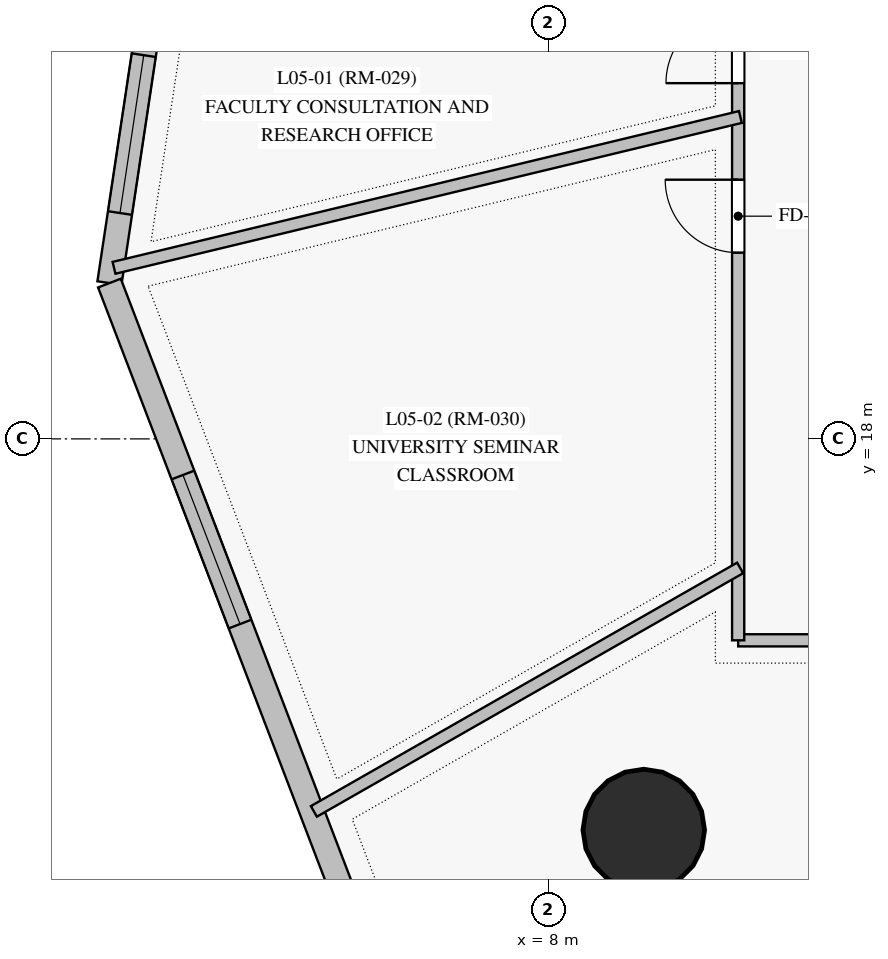
"""IFC4 building model, lengths in metres.
Left out: names, types, materials, properties, quantities, classifications, styles, units other than length and angle.
Written with IfcOpenShell. Run it as: python <this file> out.ifc"""

import sys

from ifc_helpers import new_model, si_unit, direction, frame, frame_2d, origin, origin_with_axes, origin_2d, place, context, subcontext, project, spatial, rectangle, circle, extrude, source, transform, mapped, element, fill, save


model = new_model("IFC4")
c1 = context("Model", 3, precision=1e-05, world=origin(), true_north=direction((0.0, 1.0)))
c2 = subcontext(c1, "Body", "Model", "MODEL_VIEW")
j1 = project(units=[si_unit("LENGTHUNIT", "METRE"), si_unit("PLANEANGLEUNIT", "RADIAN")], contexts=[c1])
p1 = place(None, origin())
s1 = spatial("IfcSite", under=j1, at=p1, CompositionType="ELEMENT")
p2 = place(p1, origin())
s2 = spatial("IfcBuilding", under=s1, at=p2, CompositionType="ELEMENT")
p3 = place(p2, frame((0.0, 0.0, 22.5)))
s3 = spatial("IfcBuildingStorey", under=s2, at=p3, CompositionType="ELEMENT", Elevation=22.5)
m1 = source(origin_with_axes(), c2, "Body", "SweptSolid", [
    extrude(circle(Radius=0.8, at=origin_2d()), origin(), (0.0, 0.0, 1.0), 4.0),
])
p4 = place(p3, frame((9.258, 12.854, 0.0), z_axis=(0.0, 0.0, 1.0), x_axis=(1.0, 0.0, 0.0)))
e1 = element("IfcColumn", 1, at=p4, inside=s3, PredefinedType="COLUMN", context=c2, shape_type="MappedRepresentation", body=[
    mapped(m1, transform((0.0, 0.0, 0.0), scale=1.0)),
])
p5 = place(p3, frame((3.835, 30.72, 0.0), z_axis=(0.0, 0.0, 1.0), x_axis=(-0.148854906236, -0.988859048039, 0.0)))
e2 = element("IfcWall", 2, at=p5, inside=s3, PredefinedType="SOLIDWALL", context=c2, shape_type="SweptSolid", body=[
    extrude(rectangle(XDim=10.79, YDim=0.32, at=frame_2d((5.395, 0.0))), origin(), (0.0, 0.0, 1.0), 3.75),
])
p6 = place(p5, frame((2.503, 0.0, 0.85)))
e3 = element("IfcOpeningElement", 3, at=p6, cuts=e2, PredefinedType="OPENING", context=c2, shape_type="SweptSolid", body=[
    extrude(rectangle(XDim=2.1, YDim=1.95, at=frame_2d((1.05, 0.975))), frame((0.0, 0.17, 0.0), z_axis=(0.0, -1.0, 0.0), x_axis=(1.0, 0.0, 0.0)), (0.0, 0.0, 1.0), 0.34),
])
p7 = place(p5, frame((7.758, 0.0, 0.85)))
e4 = element("IfcOpeningElement", 4, at=p7, cuts=e2, PredefinedType="OPENING", context=c2, shape_type="SweptSolid", body=[
    extrude(rectangle(XDim=2.1, YDim=1.95, at=frame_2d((1.05, 0.975))), frame((0.0, 0.17, 0.0), z_axis=(0.0, -1.0, 0.0), x_axis=(1.0, 0.0, 0.0)), (0.0, 0.0, 1.0), 0.34),
])
p8 = place(p3, frame((2.229, 20.05, 0.0), z_axis=(0.0, 0.0, 1.0), x_axis=(0.357658091535, -0.933852605907, 0.0)))
e5 = element("IfcWall", 5, at=p8, inside=s3, PredefinedType="SOLIDWALL", context=c2, shape_type="SweptSolid", body=[
    extrude(rectangle(XDim=13.391, YDim=0.32, at=frame_2d((6.696, 0.0))), origin(), (0.0, 0.0, 1.0), 3.75),
])
p9 = place(p8, frame((2.704, 0.0, 0.85)))
e6 = element("IfcOpeningElement", 6, at=p9, cuts=e5, PredefinedType="OPENING", context=c2, shape_type="SweptSolid", body=[
    extrude(rectangle(XDim=2.1, YDim=1.95, at=frame_2d((1.05, 0.975))), frame((0.0, 0.17, 0.0), z_axis=(0.0, -1.0, 0.0), x_axis=(1.0, 0.0, 0.0)), (0.0, 0.0, 1.0), 0.34),
])
p10 = place(p8, frame((9.233, 0.0, 0.85)))
e7 = element("IfcOpeningElement", 7, at=p10, cuts=e5, PredefinedType="OPENING", context=c2, shape_type="SweptSolid", body=[
    extrude(rectangle(XDim=2.1, YDim=1.95, at=frame_2d((1.05, 0.975))), frame((0.0, 0.17, 0.0), z_axis=(0.0, -1.0, 0.0), x_axis=(1.0, 0.0, 0.0)), (0.0, 0.0, 1.0), 0.34),
])
p11 = place(p3, frame((40.25, 15.35, 0.0), z_axis=(0.0, 0.0, 1.0), x_axis=(-1.0, 0.0, 0.0)))
e8 = element("IfcWall", 8, at=p11, inside=s3, PredefinedType="PARTITIONING", context=c2, shape_type="SweptSolid", body=[
    extrude(rectangle(XDim=29.75, YDim=0.16, at=frame_2d((14.875, 0.0))), origin(), (0.0, 0.0, 1.0), 3.1),
])
p12 = place(p11, frame((26.803, 0.0, 0.0)))
e9 = element("IfcOpeningElement", 9, at=p12, cuts=e8, PredefinedType="OPENING", context=c2, shape_type="SweptSolid", body=[
    extrude(rectangle(XDim=0.95, YDim=2.15, at=frame_2d((0.475, 1.075))), frame((0.0, 0.09, 0.0), z_axis=(0.0, -1.0, 0.0), x_axis=(1.0, 0.0, 0.0)), (0.0, 0.0, 1.0), 0.18),
])
p13 = place(p11, frame((23.18, 0.0, 0.0)))
e10 = element("IfcOpeningElement", 10, at=p13, cuts=e8, PredefinedType="OPENING", context=c2, shape_type="SweptSolid", body=[
    extrude(rectangle(XDim=0.95, YDim=2.15, at=frame_2d((0.475, 1.075))), frame((0.0, 0.09, 0.0), z_axis=(0.0, -1.0, 0.0), x_axis=(1.0, 0.0, 0.0)), (0.0, 0.0, 1.0), 0.18),
])
p14 = place(p11, frame((21.097, 0.0, 0.0)))
e11 = element("IfcOpeningElement", 11, at=p14, cuts=e8, PredefinedType="OPENING", context=c2, shape_type="SweptSolid", body=[
    extrude(rectangle(XDim=0.95, YDim=2.15, at=frame_2d((0.475, 1.075))), frame((0.0, 0.09, 0.0), z_axis=(0.0, -1.0, 0.0), x_axis=(1.0, 0.0, 0.0)), (0.0, 0.0, 1.0), 0.18),
])
p15 = place(p11, frame((18.772, 0.0, 0.0)))
e12 = element("IfcOpeningElement", 12, at=p15, cuts=e8, PredefinedType="OPENING", context=c2, shape_type="SweptSolid", body=[
    extrude(rectangle(XDim=0.95, YDim=2.15, at=frame_2d((0.475, 1.075))), frame((0.0, 0.09, 0.0), z_axis=(0.0, -1.0, 0.0), x_axis=(1.0, 0.0, 0.0)), (0.0, 0.0, 1.0), 0.18),
])
p16 = place(p11, frame((16.558, 0.0, 0.0)))
e13 = element("IfcOpeningElement", 13, at=p16, cuts=e8, PredefinedType="OPENING", context=c2, shape_type="SweptSolid", body=[
    extrude(rectangle(XDim=0.86, YDim=2.1, at=frame_2d((0.43, 1.05))), frame((0.0, 0.09, 0.0), z_axis=(0.0, -1.0, 0.0), x_axis=(1.0, 0.0, 0.0)), (0.0, 0.0, 1.0), 0.18),
])
p17 = place(p11, frame((14.4, 0.0, 0.0)))
e14 = element("IfcOpeningElement", 14, at=p17, cuts=e8, PredefinedType="OPENING", context=c2, shape_type="SweptSolid", body=[
    extrude(rectangle(XDim=0.95, YDim=2.15, at=frame_2d((0.475, 1.075))), frame((0.0, 0.09, 0.0), z_axis=(0.0, -1.0, 0.0), x_axis=(1.0, 0.0, 0.0)), (0.0, 0.0, 1.0), 0.18),
])
p18 = place(p11, frame((10.177, 0.0, 0.0)))
e15 = element("IfcOpeningElement", 15, at=p18, cuts=e8, PredefinedType="OPENING", context=c2, shape_type="SweptSolid", body=[
    extrude(rectangle(XDim=0.95, YDim=2.15, at=frame_2d((0.475, 1.075))), frame((0.0, 0.09, 0.0), z_axis=(0.0, -1.0, 0.0), x_axis=(1.0, 0.0, 0.0)), (0.0, 0.0, 1.0), 0.18),
])
p19 = place(p11, frame((6.962, 0.0, 0.0)))
e16 = element("IfcOpeningElement", 16, at=p19, cuts=e8, PredefinedType="OPENING", context=c2, shape_type="SweptSolid", body=[
    extrude(rectangle(XDim=0.96, YDim=2.15, at=frame_2d((0.48, 1.075))), frame((0.0, 0.09, 0.0), z_axis=(0.0, -1.0, 0.0), x_axis=(1.0, 0.0, 0.0)), (0.0, 0.0, 1.0), 0.18),
])
p20 = place(p11, frame((1.325, 0.0, 0.0)))
e17 = element("IfcOpeningElement", 17, at=p20, cuts=e8, PredefinedType="OPENING", context=c2, shape_type="SweptSolid", body=[
    extrude(rectangle(XDim=0.95, YDim=2.15, at=frame_2d((0.475, 1.075))), frame((0.0, 0.09, 0.0), z_axis=(0.0, -1.0, 0.0), x_axis=(1.0, 0.0, 0.0)), (0.0, 0.0, 1.0), 0.18),
])
p21 = place(p3, frame((10.5, 15.35, 0.0), z_axis=(0.0, 0.0, 1.0), x_axis=(0.0, 1.0, 0.0)))
e18 = element("IfcWall", 18, at=p21, inside=s3, PredefinedType="PARTITIONING", context=c2, shape_type="SweptSolid", body=[
    extrude(rectangle(XDim=22.3, YDim=0.16, at=frame_2d((11.15, 0.0))), origin(), (0.0, 0.0, 1.0), 3.15),
])
p22 = place(p21, frame((7.33, 0.0, 0.0)))
e19 = element("IfcOpeningElement", 19, at=p22, cuts=e18, PredefinedType="OPENING", context=c2, shape_type="SweptSolid", body=[
    extrude(rectangle(XDim=0.95, YDim=2.15, at=frame_2d((0.475, 1.075))), frame((0.0, 0.09, 0.0), z_axis=(0.0, -1.0, 0.0), x_axis=(1.0, 0.0, 0.0)), (0.0, 0.0, 1.0), 0.18),
])
p23 = place(p21, frame((5.1, 0.0, 0.0)))
e20 = element("IfcOpeningElement", 20, at=p23, cuts=e18, PredefinedType="OPENING", context=c2, shape_type="SweptSolid", body=[
    extrude(rectangle(XDim=0.96, YDim=2.15, at=frame_2d((0.48, 1.075))), frame((0.0, 0.09, 0.0), z_axis=(0.0, -1.0, 0.0), x_axis=(1.0, 0.0, 0.0)), (0.0, 0.0, 1.0), 0.18),
])
p24 = place(p21, frame((16.25, 0.0, 0.0)))
e21 = element("IfcOpeningElement", 21, at=p24, cuts=e18, PredefinedType="OPENING", context=c2, shape_type="SweptSolid", body=[
    extrude(rectangle(XDim=0.95, YDim=2.15, at=frame_2d((0.475, 1.075))), frame((0.0, 0.09, 0.0), z_axis=(0.0, -1.0, 0.0), x_axis=(1.0, 0.0, 0.0)), (0.0, 0.0, 1.0), 0.18),
])
p25 = place(p21, frame((10.675, 0.0, 0.0)))
e22 = element("IfcOpeningElement", 22, at=p25, cuts=e18, PredefinedType="OPENING", context=c2, shape_type="SweptSolid", body=[
    extrude(rectangle(XDim=0.96, YDim=2.15, at=frame_2d((0.48, 1.075))), frame((0.0, 0.09, 0.0), z_axis=(0.0, -1.0, 0.0), x_axis=(1.0, 0.0, 0.0)), (0.0, 0.0, 1.0), 0.18),
])
p26 = place(p3, frame((17.969, 15.383, 0.0), z_axis=(0.0, 0.0, 1.0), x_axis=(-0.684864078092, -0.728670841011, 0.0)))
e23 = element("IfcWall", 23, at=p26, inside=s3, PredefinedType="PARTITIONING", context=c2, shape_type="SweptSolid", body=[
    extrude(rectangle(XDim=12.417, YDim=0.16, at=frame_2d((6.208, 0.0))), origin(), (0.0, 0.0, 1.0), 3.1),
])
p27 = place(p3, frame((15.639, 15.37, 0.0), z_axis=(0.0, 0.0, 1.0), x_axis=(-0.753858830781, -0.657036424602, 0.0)))
e24 = element("IfcWall", 24, at=p27, inside=s3, PredefinedType="PARTITIONING", context=c2, shape_type="SweptSolid", body=[
    extrude(rectangle(XDim=11.523, YDim=0.16, at=frame_2d((5.762, 0.0))), origin(), (0.0, 0.0, 1.0), 3.75),
])
p28 = place(p3, frame((10.529, 22.235, 0.0), z_axis=(0.0, 0.0, 1.0), x_axis=(-0.972215261487, -0.234088627088, 0.0)))
e25 = element("IfcWall", 25, at=p28, inside=s3, PredefinedType="PARTITIONING", context=c2, shape_type="SweptSolid", body=[
    extrude(rectangle(XDim=8.476, YDim=0.16, at=frame_2d((4.238, 0.0))), origin(), (0.0, 0.0, 1.0), 3.75),
])
p29 = place(p3, frame((10.526, 16.302, 0.0), z_axis=(0.0, 0.0, 1.0), x_axis=(-0.86834547933, -0.495959805355, 0.0)))
e26 = element("IfcWall", 26, at=p29, inside=s3, PredefinedType="PARTITIONING", context=c2, shape_type="SweptSolid", body=[
    extrude(rectangle(XDim=6.458, YDim=0.16, at=frame_2d((3.229, 0.0))), origin(), (0.0, 0.0, 1.0), 3.75),
])
m2 = source(origin_with_axes(), c2, "Body", "SweptSolid", [
    extrude(rectangle(XDim=2.1, YDim=1.95, at=frame_2d((1.05, 0.975))), frame((0.0, 0.03, 0.0), z_axis=(0.0, -1.0, 0.0), x_axis=(1.0, 0.0, 0.0)), (0.0, 0.0, 1.0), 0.06),
])
p30 = place(p7, origin())
e27 = element("IfcWindow", 27, at=p30, inside=s3, PartitioningType="SINGLE_PANEL", PredefinedType="WINDOW", context=c2, shape_type="MappedRepresentation", body=[
    mapped(m2, transform((0.0, 0.0, 0.0), scale=1.0)),
])
fill(e4, e27)
p31 = place(p9, origin())
e28 = element("IfcWindow", 28, at=p31, inside=s3, PartitioningType="SINGLE_PANEL", PredefinedType="WINDOW", context=c2, shape_type="MappedRepresentation", body=[
    mapped(m2, transform((0.0, 0.0, 0.0), scale=1.0)),
])
fill(e6, e28)
m3 = source(origin_with_axes(), c2, "Body", "SweptSolid", [
    extrude(rectangle(XDim=0.95, YDim=2.15, at=frame_2d((0.475, 1.075))), frame((0.0, 0.025, 0.0), z_axis=(0.0, -1.0, 0.0), x_axis=(1.0, 0.0, 0.0)), (0.0, 0.0, 1.0), 0.05),
])
p32 = place(p22, origin())
e29 = element("IfcDoor", 29, at=p32, inside=s3, OperationType="SINGLE_SWING_LEFT", PredefinedType="DOOR", context=c2, shape_type="MappedRepresentation", body=[
    mapped(m3, transform((0.0, 0.0, 0.0), scale=1.0)),
])
fill(e19, e29)
m4 = source(origin_with_axes(), c2, "Body", "SweptSolid", [
    extrude(rectangle(XDim=0.96, YDim=2.15, at=frame_2d((0.48, 1.075))), frame((0.0, 0.025, 0.0), z_axis=(0.0, -1.0, 0.0), x_axis=(1.0, 0.0, 0.0)), (0.0, 0.0, 1.0), 0.05),
])
p33 = place(p23, origin())
e30 = element("IfcDoor", 30, at=p33, inside=s3, OperationType="SINGLE_SWING_RIGHT", PredefinedType="DOOR", context=c2, shape_type="MappedRepresentation", body=[
    mapped(m4, transform((0.0, 0.0, 0.0), scale=1.0)),
])
fill(e20, e30)
save(model, sys.argv[1])
